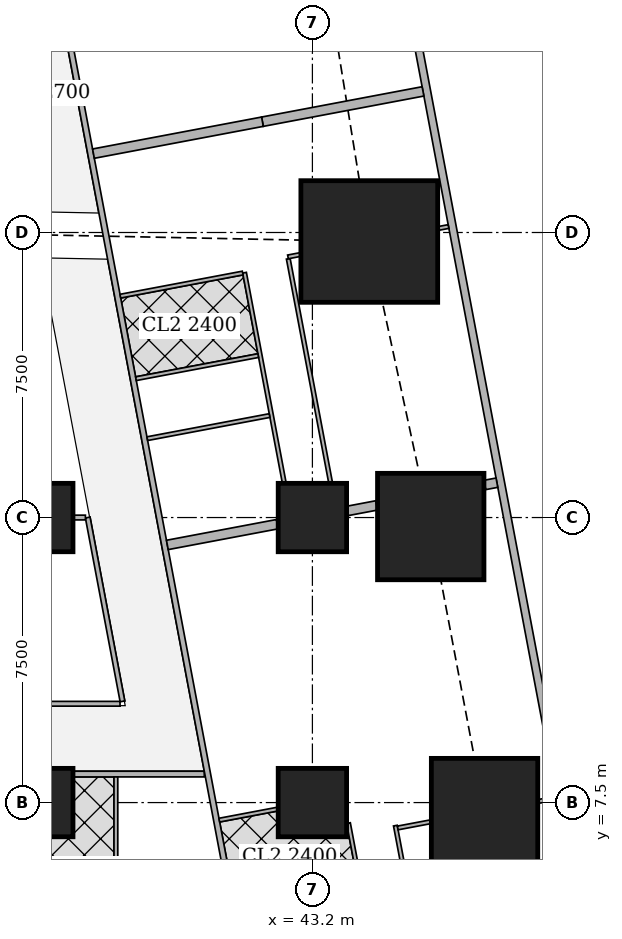
"""IFC4 building model, lengths in metres.
Left out: names, types, materials, properties, quantities, classifications, styles, units other than length and angle.
Written with IfcOpenShell. Run it as: python <this file> out.ifc"""

import sys

from ifc_helpers import new_model, si_unit, direction, frame, frame_2d, origin, origin_2d, place, context, subcontext, project, spatial, rectangle, extrude, element, fill, save


model = new_model("IFC4")
c1 = context("Model", 3, precision=1e-05, world=origin(), true_north=direction((0.0, 1.0)))
c2 = subcontext(c1, "Body", "Model", "MODEL_VIEW")
j1 = project(units=[si_unit("LENGTHUNIT", "METRE"), si_unit("PLANEANGLEUNIT", "RADIAN")], contexts=[c1])
p1 = place(None, origin())
s1 = spatial("IfcSite", under=j1, at=p1, CompositionType="ELEMENT")
p2 = place(p1, origin())
s2 = spatial("IfcBuilding", under=s1, at=p2, CompositionType="ELEMENT")
p3 = place(p2, frame((0.0, 0.0, 53.75)))
s3 = spatial("IfcBuildingStorey", under=s2, at=p3, CompositionType="ELEMENT", Elevation=53.75)
for number, where, z_axis, x_axis in (
    (1, (36.0, 7.5, 0.0), (0.0, 0.0, 1.0), (1.0, 0.0, 0.0)),
    (2, (43.2, 7.5, 0.0), (0.0, 0.0, 1.0), (1.0, 0.0, 0.0)),
):
    element("IfcColumn", number, at=place(p3, frame(where, z_axis=z_axis, x_axis=x_axis)), inside=s3, PredefinedType="COLUMN", context=c2, shape_type="SweptSolid", body=[
        extrude(rectangle(XDim=1.8, YDim=1.8, at=origin_2d()), origin(), (0.0, 0.0, 1.0), 3.75),
    ])
p4 = place(p3, frame((47.73, 7.263, 0.0), z_axis=(0.0, 0.0, 1.0), x_axis=(1.0, 0.0, 0.0)))
e3 = element("IfcColumn", 3, at=p4, inside=s3, PredefinedType="COLUMN", context=c2, shape_type="SweptSolid", body=[
    extrude(rectangle(XDim=2.8, YDim=2.8, at=origin_2d()), origin(), (0.0, 0.0, 1.0), 3.75),
])
for number, where, z_axis, x_axis in (
    (4, (36.0, 15.0, 0.0), (0.0, 0.0, 1.0), (1.0, 0.0, 0.0)),
    (5, (43.2, 15.0, 0.0), (0.0, 0.0, 1.0), (1.0, 0.0, 0.0)),
):
    element("IfcColumn", number, at=place(p3, frame(where, z_axis=z_axis, x_axis=x_axis)), inside=s3, PredefinedType="COLUMN", context=c2, shape_type="SweptSolid", body=[
        extrude(rectangle(XDim=1.8, YDim=1.8, at=origin_2d()), origin(), (0.0, 0.0, 1.0), 3.75),
    ])
p5 = place(p3, frame((46.314, 14.763, 0.0), z_axis=(0.0, 0.0, 1.0), x_axis=(1.0, 0.0, 0.0)))
e6 = element("IfcColumn", 6, at=p5, inside=s3, PredefinedType="COLUMN", context=c2, shape_type="SweptSolid", body=[
    extrude(rectangle(XDim=2.8, YDim=2.8, at=origin_2d()), origin(), (0.0, 0.0, 1.0), 3.75),
])
p6 = place(p3, frame((44.697, 22.263, 0.0), z_axis=(0.0, 0.0, 1.0), x_axis=(1.0, 0.0, 0.0)))
e7 = element("IfcColumn", 7, at=p6, inside=s3, PredefinedType="COLUMN", context=c2, shape_type="SweptSolid", body=[
    extrude(rectangle(XDim=3.6, YDim=3.2, at=origin_2d()), origin(), (0.0, 0.0, 1.0), 3.75),
])
p7 = place(p3, frame((50.653, 2.703, 0.0), z_axis=(0.0, 0.0, 1.0), x_axis=(-0.185612026696, 0.982623109613, 0.0)))
e8 = element("IfcWall", 8, at=p7, inside=s3, PredefinedType="SOLIDWALL", context=c2, shape_type="SweptSolid", body=[
    extrude(rectangle(XDim=41.393, YDim=0.2, at=frame_2d((20.697, 0.0))), origin(), (0.0, 0.0, 1.0), 3.5),
])
p8 = place(p7, frame((1.633, 0.0, 0.9)))
e9 = element("IfcOpeningElement", 9, at=p8, cuts=e8, PredefinedType="OPENING", context=c2, shape_type="SweptSolid", body=[
    extrude(rectangle(XDim=1.8, YDim=1.5, at=frame_2d((0.9, 0.75))), frame((0.0, 0.11, 0.0), z_axis=(0.0, -1.0, 0.0), x_axis=(1.0, 0.0, 0.0)), (0.0, 0.0, 1.0), 0.22),
])
p9 = place(p7, frame((6.032, 0.0, 0.9)))
e10 = element("IfcOpeningElement", 10, at=p9, cuts=e8, PredefinedType="OPENING", context=c2, shape_type="SweptSolid", body=[
    extrude(rectangle(XDim=1.8, YDim=1.5, at=frame_2d((0.9, 0.75))), frame((0.0, 0.11, 0.0), z_axis=(0.0, -1.0, 0.0), x_axis=(1.0, 0.0, 0.0)), (0.0, 0.0, 1.0), 0.22),
])
p10 = place(p7, frame((9.848, 0.0, 0.9)))
e11 = element("IfcOpeningElement", 11, at=p10, cuts=e8, PredefinedType="OPENING", context=c2, shape_type="SweptSolid", body=[
    extrude(rectangle(XDim=1.8, YDim=1.5, at=frame_2d((0.9, 0.75))), frame((0.0, 0.11, 0.0), z_axis=(0.0, -1.0, 0.0), x_axis=(1.0, 0.0, 0.0)), (0.0, 0.0, 1.0), 0.22),
])
p11 = place(p7, frame((17.481, 0.0, 0.9)))
e12 = element("IfcOpeningElement", 12, at=p11, cuts=e8, PredefinedType="OPENING", context=c2, shape_type="SweptSolid", body=[
    extrude(rectangle(XDim=1.8, YDim=1.5, at=frame_2d((0.9, 0.75))), frame((0.0, 0.11, 0.0), z_axis=(0.0, -1.0, 0.0), x_axis=(1.0, 0.0, 0.0)), (0.0, 0.0, 1.0), 0.22),
])
p12 = place(p7, frame((21.297, 0.0, 0.9)))
e13 = element("IfcOpeningElement", 13, at=p12, cuts=e8, PredefinedType="OPENING", context=c2, shape_type="SweptSolid", body=[
    extrude(rectangle(XDim=1.8, YDim=1.5, at=frame_2d((0.9, 0.75))), frame((0.0, 0.11, 0.0), z_axis=(0.0, -1.0, 0.0), x_axis=(1.0, 0.0, 0.0)), (0.0, 0.0, 1.0), 0.22),
])
p13 = place(p7, frame((25.113, 0.0, 0.9)))
e14 = element("IfcOpeningElement", 14, at=p13, cuts=e8, PredefinedType="OPENING", context=c2, shape_type="SweptSolid", body=[
    extrude(rectangle(XDim=1.8, YDim=1.5, at=frame_2d((0.9, 0.75))), frame((0.0, 0.11, 0.0), z_axis=(0.0, -1.0, 0.0), x_axis=(1.0, 0.0, 0.0)), (0.0, 0.0, 1.0), 0.22),
])
p14 = place(p7, frame((28.93, 0.0, 0.9)))
e15 = element("IfcOpeningElement", 15, at=p14, cuts=e8, PredefinedType="OPENING", context=c2, shape_type="SweptSolid", body=[
    extrude(rectangle(XDim=1.8, YDim=1.5, at=frame_2d((0.9, 0.75))), frame((0.0, 0.11, 0.0), z_axis=(0.0, -1.0, 0.0), x_axis=(1.0, 0.0, 0.0)), (0.0, 0.0, 1.0), 0.22),
])
p15 = place(p7, frame((32.746, 0.0, 0.9)))
e16 = element("IfcOpeningElement", 16, at=p15, cuts=e8, PredefinedType="OPENING", context=c2, shape_type="SweptSolid", body=[
    extrude(rectangle(XDim=1.8, YDim=1.5, at=frame_2d((0.9, 0.75))), frame((0.0, 0.11, 0.0), z_axis=(0.0, -1.0, 0.0), x_axis=(1.0, 0.0, 0.0)), (0.0, 0.0, 1.0), 0.22),
])
p16 = place(p7, frame((36.481, 0.0, 0.9)))
e17 = element("IfcOpeningElement", 17, at=p16, cuts=e8, PredefinedType="OPENING", context=c2, shape_type="SweptSolid", body=[
    extrude(rectangle(XDim=1.8, YDim=1.5, at=frame_2d((0.9, 0.75))), frame((0.0, 0.11, 0.0), z_axis=(0.0, -1.0, 0.0), x_axis=(1.0, 0.0, 0.0)), (0.0, 0.0, 1.0), 0.22),
])
p17 = place(p3, frame((40.355, 8.25, 0.0), z_axis=(0.0, 0.0, 1.0), x_axis=(-1.0, 0.0, 0.0)))
e18 = element("IfcWall", 18, at=p17, inside=s3, PredefinedType="SOLIDWALL", context=c2, shape_type="SweptSolid", body=[
    extrude(rectangle(XDim=3.454, YDim=0.15, at=frame_2d((1.727, 0.0))), origin(), (0.0, 0.0, 1.0), 3.5),
])
p18 = place(p17, frame((0.15, 0.0, 0.0)))
e19 = element("IfcOpeningElement", 19, at=p18, cuts=e18, PredefinedType="OPENING", context=c2, shape_type="SweptSolid", body=[
    extrude(rectangle(XDim=1.0, YDim=2.1, at=frame_2d((0.5, 1.05))), frame((0.0, 0.085, 0.0), z_axis=(0.0, -1.0, 0.0), x_axis=(1.0, 0.0, 0.0)), (0.0, 0.0, 1.0), 0.17),
])
p19 = place(p3, frame((35.094, 36.585, 0.0), z_axis=(0.0, 0.0, 1.0), x_axis=(0.185588860311, -0.982627485331, 0.0)))
e20 = element("IfcWall", 20, at=p19, inside=s3, PredefinedType="SOLIDWALL", context=c2, shape_type="SweptSolid", body=[
    extrude(rectangle(XDim=34.797, YDim=0.15, at=frame_2d((17.399, 0.0))), origin(), (0.0, 0.0, 1.0), 2.5),
])
p20 = place(p19, frame((9.828, 0.0, 0.0)))
e21 = element("IfcOpeningElement", 21, at=p20, cuts=e20, PredefinedType="OPENING", context=c2, shape_type="SweptSolid", body=[
    extrude(rectangle(XDim=1.0, YDim=2.1, at=frame_2d((0.5, 1.05))), frame((0.0, 0.085, 0.0), z_axis=(0.0, -1.0, 0.0), x_axis=(1.0, 0.0, 0.0)), (0.0, 0.0, 1.0), 0.17),
])
p21 = place(p19, frame((13.645, 0.0, 0.0)))
e22 = element("IfcOpeningElement", 22, at=p21, cuts=e20, PredefinedType="OPENING", context=c2, shape_type="SweptSolid", body=[
    extrude(rectangle(XDim=1.0, YDim=2.1, at=frame_2d((0.5, 1.05))), frame((0.0, 0.085, 0.0), z_axis=(0.0, -1.0, 0.0), x_axis=(1.0, 0.0, 0.0)), (0.0, 0.0, 1.0), 0.17),
])
p22 = place(p19, frame((25.9, 0.0, 0.0)))
e23 = element("IfcOpeningElement", 23, at=p22, cuts=e20, PredefinedType="OPENING", context=c2, shape_type="SweptSolid", body=[
    extrude(rectangle(XDim=1.0, YDim=2.1, at=frame_2d((0.5, 1.05))), frame((0.0, 0.085, 0.0), z_axis=(0.0, -1.0, 0.0), x_axis=(1.0, 0.0, 0.0)), (0.0, 0.0, 1.0), 0.17),
])
p23 = place(p3, frame((38.029, 4.9, 0.0), z_axis=(0.0, 0.0, 1.0), x_axis=(0.0, 1.0, 0.0)))
e24 = element("IfcWall", 24, at=p23, inside=s3, PredefinedType="PARTITIONING", context=c2, shape_type="SweptSolid", body=[
    extrude(rectangle(XDim=3.275, YDim=0.1, at=frame_2d((1.638, 0.0))), origin(), (0.0, 0.0, 1.0), 3.5),
])
p24 = place(p3, frame((42.565, 21.809, 0.0), z_axis=(0.0, 0.0, 1.0), x_axis=(0.185719768524, -0.982602751665, 0.0)))
e25 = element("IfcWall", 25, at=p24, inside=s3, PredefinedType="PARTITIONING", context=c2, shape_type="SweptSolid", body=[
    extrude(rectangle(XDim=6.004, YDim=0.1, at=frame_2d((3.002, 0.0))), origin(), (0.0, 0.0, 1.0), 2.5),
])
p25 = place(p24, frame((1.45, 0.0, 0.0)))
e26 = element("IfcOpeningElement", 26, at=p25, cuts=e25, PredefinedType="OPENING", context=c2, shape_type="SweptSolid", body=[
    extrude(rectangle(XDim=0.9, YDim=2.1, at=frame_2d((0.45, 1.05))), frame((0.0, 0.06, 0.0), z_axis=(0.0, -1.0, 0.0), x_axis=(1.0, 0.0, 0.0)), (0.0, 0.0, 1.0), 0.12),
])
p26 = place(p3, frame((41.414, 21.442, 0.0), z_axis=(0.0, 0.0, 1.0), x_axis=(0.185605379031, -0.982624365297, 0.0)))
e27 = element("IfcWall", 27, at=p26, inside=s3, PredefinedType="PARTITIONING", context=c2, shape_type="SweptSolid", body=[
    extrude(rectangle(XDim=5.63, YDim=0.1, at=frame_2d((2.815, 0.0))), origin(), (0.0, 0.0, 1.0), 3.5),
])
p27 = place(p26, frame((0.655, 0.0, 0.0)))
e28 = element("IfcOpeningElement", 28, at=p27, cuts=e27, PredefinedType="OPENING", context=c2, shape_type="SweptSolid", body=[
    extrude(rectangle(XDim=0.9, YDim=2.1, at=frame_2d((0.45, 1.05))), frame((0.0, 0.06, 0.0), z_axis=(0.0, -1.0, 0.0), x_axis=(1.0, 0.0, 0.0)), (0.0, 0.0, 1.0), 0.12),
])
p28 = place(p26, frame((4.58, 0.0, 0.0)))
e29 = element("IfcOpeningElement", 29, at=p28, cuts=e27, PredefinedType="OPENING", context=c2, shape_type="SweptSolid", body=[
    extrude(rectangle(XDim=0.9, YDim=2.1, at=frame_2d((0.45, 1.05))), frame((0.0, 0.06, 0.0), z_axis=(0.0, -1.0, 0.0), x_axis=(1.0, 0.0, 0.0)), (0.0, 0.0, 1.0), 0.12),
])
p29 = place(p26, frame((2.562, 0.0, 0.0)))
e30 = element("IfcOpeningElement", 30, at=p29, cuts=e27, PredefinedType="OPENING", context=c2, shape_type="SweptSolid", body=[
    extrude(rectangle(XDim=0.9, YDim=2.1, at=frame_2d((0.45, 1.05))), frame((0.0, 0.06, 0.0), z_axis=(0.0, -1.0, 0.0), x_axis=(1.0, 0.0, 0.0)), (0.0, 0.0, 1.0), 0.12),
])
p30 = place(p3, frame((46.782, 22.657, 0.0), z_axis=(0.0, 0.0, 1.0), x_axis=(-0.982574553168, -0.185868898601, 0.0)))
e31 = element("IfcWall", 31, at=p30, inside=s3, PredefinedType="PARTITIONING", context=c2, shape_type="SweptSolid", body=[
    extrude(rectangle(XDim=0.28, YDim=0.1, at=frame_2d((0.14, 0.0))), origin(), (0.0, 0.0, 1.0), 3.5),
])
p31 = place(p3, frame((42.887, 21.921, 0.0), z_axis=(0.0, 0.0, 1.0), x_axis=(-0.982274918032, -0.187445953293, 0.0)))
e32 = element("IfcWall", 32, at=p31, inside=s3, PredefinedType="PARTITIONING", context=c2, shape_type="SweptSolid", body=[
    extrude(rectangle(XDim=0.336, YDim=0.1, at=frame_2d((0.168, 0.0))), origin(), (0.0, 0.0, 1.0), 2.5),
])
for number, where, z_axis, x_axis in (
    (33, (41.365, 21.433, 0.0), (0.0, 0.0, 1.0), (-0.983, -0.186, 0.0)),
    (34, (42.073, 17.683, 0.0), (0.0, 0.0, 1.0), (-0.983, -0.186, 0.0)),
    (35, (41.775, 19.261, 0.0), (0.0, 0.0, 1.0), (-0.983, -0.186, 0.0)),
):
    element("IfcWall", number, at=place(p3, frame(where, z_axis=z_axis, x_axis=x_axis)), inside=s3, PredefinedType="PARTITIONING", context=c2, shape_type="SweptSolid", body=[
        extrude(rectangle(XDim=3.275, YDim=0.1, at=frame_2d((1.637, 0.0))), origin(), (0.0, 0.0, 1.0), 3.5),
    ])
p32 = place(p3, frame((46.11, 26.213, 0.0), z_axis=(0.0, 0.0, 1.0), x_axis=(-0.982633535512, -0.185556823879, 0.0)))
e36 = element("IfcWall", 36, at=p32, inside=s3, PredefinedType="SOLIDWALL", context=c2, shape_type="SweptSolid", body=[
    extrude(rectangle(XDim=4.3, YDim=0.25, at=frame_2d((2.15, 0.0))), origin(), (0.0, 0.0, 1.0), 2.05),
])
p33 = place(p3, frame((41.885, 25.415, 0.0), z_axis=(0.0, 0.0, 1.0), x_axis=(-0.982612837616, -0.185666398014, 0.0)))
e37 = element("IfcWall", 37, at=p33, inside=s3, PredefinedType="SOLIDWALL", context=c2, shape_type="SweptSolid", body=[
    extrude(rectangle(XDim=4.525, YDim=0.25, at=frame_2d((2.262, 0.0))), origin(), (0.0, 0.0, 1.0), 3.5),
])
p34 = place(p3, frame((45.383, 6.894, 0.0), z_axis=(0.0, 0.0, 1.0), x_axis=(0.185791461635, -0.982589198385, 0.0)))
e38 = element("IfcWall", 38, at=p34, inside=s3, PredefinedType="PARTITIONING", context=c2, shape_type="SweptSolid", body=[
    extrude(rectangle(XDim=3.687, YDim=0.1, at=frame_2d((1.844, 0.0))), origin(), (0.0, 0.0, 1.0), 3.5),
])
p35 = place(p34, frame((1.3, 0.0, 0.0)))
e39 = element("IfcOpeningElement", 39, at=p35, cuts=e38, PredefinedType="OPENING", context=c2, shape_type="SweptSolid", body=[
    extrude(rectangle(XDim=0.9, YDim=2.1, at=frame_2d((0.45, 1.05))), frame((0.0, 0.06, 0.0), z_axis=(0.0, -1.0, 0.0), x_axis=(1.0, 0.0, 0.0)), (0.0, 0.0, 1.0), 0.12),
])
p36 = place(p3, frame((44.149, 6.96, 0.0), z_axis=(0.0, 0.0, 1.0), x_axis=(0.185824941804, -0.982582867245, 0.0)))
e40 = element("IfcWall", 40, at=p36, inside=s3, PredefinedType="PARTITIONING", context=c2, shape_type="SweptSolid", body=[
    extrude(rectangle(XDim=4.01, YDim=0.1, at=frame_2d((2.005, 0.0))), origin(), (0.0, 0.0, 1.0), 3.5),
])
p37 = place(p36, frame((0.35, 0.0, 0.0)))
e41 = element("IfcOpeningElement", 41, at=p37, cuts=e40, PredefinedType="OPENING", context=c2, shape_type="SweptSolid", body=[
    extrude(rectangle(XDim=0.9, YDim=2.1, at=frame_2d((0.45, 1.05))), frame((0.0, 0.06, 0.0), z_axis=(0.0, -1.0, 0.0), x_axis=(1.0, 0.0, 0.0)), (0.0, 0.0, 1.0), 0.12),
])
p38 = place(p36, frame((1.856, 0.0, 0.0)))
e42 = element("IfcOpeningElement", 42, at=p38, cuts=e40, PredefinedType="OPENING", context=c2, shape_type="SweptSolid", body=[
    extrude(rectangle(XDim=0.9, YDim=2.1, at=frame_2d((0.45, 1.05))), frame((0.0, 0.06, 0.0), z_axis=(0.0, -1.0, 0.0), x_axis=(1.0, 0.0, 0.0)), (0.0, 0.0, 1.0), 0.12),
])
p39 = place(p3, frame((49.622, 7.62, 0.0), z_axis=(0.0, 0.0, 1.0), x_axis=(-0.982629142467, -0.185580086147, 0.0)))
e43 = element("IfcWall", 43, at=p39, inside=s3, PredefinedType="PARTITIONING", context=c2, shape_type="SweptSolid", body=[
    extrude(rectangle(XDim=0.491, YDim=0.1, at=frame_2d((0.245, 0.0))), origin(), (0.0, 0.0, 1.0), 3.5),
])
p40 = place(p3, frame((46.32, 6.997, 0.0), z_axis=(0.0, 0.0, 1.0), x_axis=(-0.982635224332, -0.185547880349, 0.0)))
e44 = element("IfcWall", 44, at=p40, inside=s3, PredefinedType="PARTITIONING", context=c2, shape_type="SweptSolid", body=[
    extrude(rectangle(XDim=0.889, YDim=0.1, at=frame_2d((0.445, 0.0))), origin(), (0.0, 0.0, 1.0), 3.5),
])
p41 = place(p3, frame((42.29, 7.329, 0.0), z_axis=(0.0, 0.0, 1.0), x_axis=(-0.98258870752, -0.18579405764, 0.0)))
e45 = element("IfcWall", 45, at=p41, inside=s3, PredefinedType="PARTITIONING", context=c2, shape_type="SweptSolid", body=[
    extrude(rectangle(XDim=1.566, YDim=0.1, at=frame_2d((0.783, 0.0))), origin(), (0.0, 0.0, 1.0), 3.5),
])
p42 = place(p3, frame((48.055, 15.917, 0.0), z_axis=(0.0, 0.0, 1.0), x_axis=(-0.982510408223, -0.186207673669, 0.0)))
e46 = element("IfcWall", 46, at=p42, inside=s3, PredefinedType="SOLIDWALL", context=c2, shape_type="SweptSolid", body=[
    extrude(rectangle(XDim=0.323, YDim=0.25, at=frame_2d((0.161, 0.0))), origin(), (0.0, 0.0, 1.0), 3.5),
])
p43 = place(p3, frame((44.89, 15.319, 0.0), z_axis=(0.0, 0.0, 1.0), x_axis=(-0.982540856152, -0.186046945666, 0.0)))
e47 = element("IfcWall", 47, at=p43, inside=s3, PredefinedType="SOLIDWALL", context=c2, shape_type="SweptSolid", body=[
    extrude(rectangle(XDim=0.78, YDim=0.25, at=frame_2d((0.39, 0.0))), origin(), (0.0, 0.0, 1.0), 2.05),
])
p44 = place(p3, frame((42.276, 14.825, 0.0), z_axis=(0.0, 0.0, 1.0), x_axis=(-0.982656521819, -0.185435056358, 0.0)))
e48 = element("IfcWall", 48, at=p44, inside=s3, PredefinedType="SOLIDWALL", context=c2, shape_type="SweptSolid", body=[
    extrude(rectangle(XDim=2.944, YDim=0.25, at=frame_2d((1.472, 0.0))), origin(), (0.0, 0.0, 1.0), 3.5),
])
p45 = place(p3, frame((28.95, 10.1, 0.0), z_axis=(0.0, 0.0, 1.0), x_axis=(1.0, 0.0, 0.0)))
e49 = element("IfcWall", 49, at=p45, inside=s3, PredefinedType="PARTITIONING", context=c2, shape_type="SweptSolid", body=[
    extrude(rectangle(XDim=9.188, YDim=0.125, at=frame_2d((4.594, 0.0))), origin(), (0.0, 0.0, 1.0), 3.5),
])
p46 = place(p3, frame((38.202, 10.163, 0.0), z_axis=(0.0, 0.0, 1.0), x_axis=(-0.185641892853, 0.982617467593, 0.0)))
e50 = element("IfcWall", 50, at=p46, inside=s3, PredefinedType="PARTITIONING", context=c2, shape_type="SweptSolid", body=[
    extrude(rectangle(XDim=4.922, YDim=0.125, at=frame_2d((2.461, 0.0))), origin(), (0.0, 0.0, 1.0), 3.5),
])
p47 = place(p46, frame((0.708, 0.0, 0.0)))
e51 = element("IfcOpeningElement", 51, at=p47, cuts=e50, PredefinedType="OPENING", context=c2, shape_type="SweptSolid", body=[
    extrude(rectangle(XDim=1.0, YDim=2.1, at=frame_2d((0.5, 1.05))), frame((0.0, 0.073, 0.0), z_axis=(0.0, -1.0, 0.0), x_axis=(1.0, 0.0, 0.0)), (0.0, 0.0, 1.0), 0.145),
])
p48 = place(p3, frame((36.901, 15.0, 0.0), z_axis=(0.0, 0.0, 1.0), x_axis=(1.0, 0.0, 0.0)))
e52 = element("IfcWall", 52, at=p48, inside=s3, PredefinedType="PARTITIONING", context=c2, shape_type="SweptSolid", body=[
    extrude(rectangle(XDim=0.326, YDim=0.125, at=frame_2d((0.163, 0.0))), origin(), (0.0, 0.0, 1.0), 3.5),
])
p49 = place(p9, origin())
e53 = element("IfcWindow", 53, at=p49, inside=s3, PartitioningType="SINGLE_PANEL", PredefinedType="WINDOW", context=c2, shape_type="SweptSolid", body=[
    extrude(rectangle(XDim=1.8, YDim=1.5, at=frame_2d((0.9, 0.75))), frame((0.0, 0.03, 0.0), z_axis=(0.0, -1.0, 0.0), x_axis=(1.0, 0.0, 0.0)), (0.0, 0.0, 1.0), 0.06),
])
fill(e10, e53)
p50 = place(p10, origin())
e54 = element("IfcWindow", 54, at=p50, inside=s3, PartitioningType="SINGLE_PANEL", PredefinedType="WINDOW", context=c2, shape_type="SweptSolid", body=[
    extrude(rectangle(XDim=1.8, YDim=1.5, at=frame_2d((0.9, 0.75))), frame((0.0, 0.03, 0.0), z_axis=(0.0, -1.0, 0.0), x_axis=(1.0, 0.0, 0.0)), (0.0, 0.0, 1.0), 0.06),
])
fill(e11, e54)
p51 = place(p11, origin())
e55 = element("IfcWindow", 55, at=p51, inside=s3, PartitioningType="SINGLE_PANEL", PredefinedType="WINDOW", context=c2, shape_type="SweptSolid", body=[
    extrude(rectangle(XDim=1.8, YDim=1.5, at=frame_2d((0.9, 0.75))), frame((0.0, 0.03, 0.0), z_axis=(0.0, -1.0, 0.0), x_axis=(1.0, 0.0, 0.0)), (0.0, 0.0, 1.0), 0.06),
])
fill(e12, e55)
p52 = place(p12, origin())
e56 = element("IfcWindow", 56, at=p52, inside=s3, PartitioningType="SINGLE_PANEL", PredefinedType="WINDOW", context=c2, shape_type="SweptSolid", body=[
    extrude(rectangle(XDim=1.8, YDim=1.5, at=frame_2d((0.9, 0.75))), frame((0.0, 0.03, 0.0), z_axis=(0.0, -1.0, 0.0), x_axis=(1.0, 0.0, 0.0)), (0.0, 0.0, 1.0), 0.06),
])
fill(e13, e56)
p53 = place(p18, origin())
e57 = element("IfcDoor", 57, at=p53, inside=s3, OperationType="SINGLE_SWING_LEFT", PredefinedType="DOOR", context=c2, shape_type="SweptSolid", body=[
    extrude(rectangle(XDim=1.0, YDim=2.1, at=frame_2d((0.5, 1.05))), frame((0.0, 0.025, 0.0), z_axis=(0.0, -1.0, 0.0), x_axis=(1.0, 0.0, 0.0)), (0.0, 0.0, 1.0), 0.05),
])
fill(e19, e57)
p54 = place(p20, origin())
e58 = element("IfcDoor", 58, at=p54, inside=s3, OperationType="SINGLE_SWING_LEFT", PredefinedType="DOOR", context=c2, shape_type="SweptSolid", body=[
    extrude(rectangle(XDim=1.0, YDim=2.1, at=frame_2d((0.5, 1.05))), frame((0.0, 0.025, 0.0), z_axis=(0.0, -1.0, 0.0), x_axis=(1.0, 0.0, 0.0)), (0.0, 0.0, 1.0), 0.05),
])
fill(e21, e58)
p55 = place(p25, origin())
e59 = element("IfcDoor", 59, at=p55, inside=s3, OperationType="SINGLE_SWING_RIGHT", PredefinedType="DOOR", context=c2, shape_type="SweptSolid", body=[
    extrude(rectangle(XDim=0.9, YDim=2.1, at=frame_2d((0.45, 1.05))), frame((0.0, 0.025, 0.0), z_axis=(0.0, -1.0, 0.0), x_axis=(1.0, 0.0, 0.0)), (0.0, 0.0, 1.0), 0.05),
])
fill(e26, e59)
p56 = place(p27, origin())
e60 = element("IfcDoor", 60, at=p56, inside=s3, OperationType="SINGLE_SWING_RIGHT", PredefinedType="DOOR", context=c2, shape_type="SweptSolid", body=[
    extrude(rectangle(XDim=0.9, YDim=2.1, at=frame_2d((0.45, 1.05))), frame((0.0, 0.025, 0.0), z_axis=(0.0, -1.0, 0.0), x_axis=(1.0, 0.0, 0.0)), (0.0, 0.0, 1.0), 0.05),
])
fill(e28, e60)
p57 = place(p28, origin())
e61 = element("IfcDoor", 61, at=p57, inside=s3, OperationType="SINGLE_SWING_LEFT", PredefinedType="DOOR", context=c2, shape_type="SweptSolid", body=[
    extrude(rectangle(XDim=0.9, YDim=2.1, at=frame_2d((0.45, 1.05))), frame((0.0, 0.025, 0.0), z_axis=(0.0, -1.0, 0.0), x_axis=(1.0, 0.0, 0.0)), (0.0, 0.0, 1.0), 0.05),
])
fill(e29, e61)
p58 = place(p29, origin())
e62 = element("IfcDoor", 62, at=p58, inside=s3, OperationType="SINGLE_SWING_LEFT", PredefinedType="DOOR", context=c2, shape_type="SweptSolid", body=[
    extrude(rectangle(XDim=0.9, YDim=2.1, at=frame_2d((0.45, 1.05))), frame((0.0, 0.025, 0.0), z_axis=(0.0, -1.0, 0.0), x_axis=(1.0, 0.0, 0.0)), (0.0, 0.0, 1.0), 0.05),
])
fill(e30, e62)
p59 = place(p21, origin())
e63 = element("IfcDoor", 63, at=p59, inside=s3, OperationType="SINGLE_SWING_LEFT", PredefinedType="DOOR", context=c2, shape_type="SweptSolid", body=[
    extrude(rectangle(XDim=1.0, YDim=2.1, at=frame_2d((0.5, 1.05))), frame((0.0, 0.025, 0.0), z_axis=(0.0, -1.0, 0.0), x_axis=(1.0, 0.0, 0.0)), (0.0, 0.0, 1.0), 0.05),
])
fill(e22, e63)
p60 = place(p37, origin())
e64 = element("IfcDoor", 64, at=p60, inside=s3, OperationType="SINGLE_SWING_RIGHT", PredefinedType="DOOR", context=c2, shape_type="SweptSolid", body=[
    extrude(rectangle(XDim=0.9, YDim=2.1, at=frame_2d((0.45, 1.05))), frame((0.0, 0.025, 0.0), z_axis=(0.0, -1.0, 0.0), x_axis=(1.0, 0.0, 0.0)), (0.0, 0.0, 1.0), 0.05),
])
fill(e41, e64)
p61 = place(p22, origin())
e65 = element("IfcDoor", 65, at=p61, inside=s3, OperationType="SINGLE_SWING_RIGHT", PredefinedType="DOOR", context=c2, shape_type="SweptSolid", body=[
    extrude(rectangle(XDim=1.0, YDim=2.1, at=frame_2d((0.5, 1.05))), frame((0.0, 0.025, 0.0), z_axis=(0.0, -1.0, 0.0), x_axis=(1.0, 0.0, 0.0)), (0.0, 0.0, 1.0), 0.05),
])
fill(e23, e65)
p62 = place(p47, origin())
e66 = element("IfcDoor", 66, at=p62, inside=s3, OperationType="SINGLE_SWING_LEFT", PredefinedType="DOOR", context=c2, shape_type="SweptSolid", body=[
    extrude(rectangle(XDim=1.0, YDim=2.1, at=frame_2d((0.5, 1.05))), frame((0.0, 0.025, 0.0), z_axis=(0.0, -1.0, 0.0), x_axis=(1.0, 0.0, 0.0)), (0.0, 0.0, 1.0), 0.05),
])
fill(e51, e66)
save(model, sys.argv[1])
